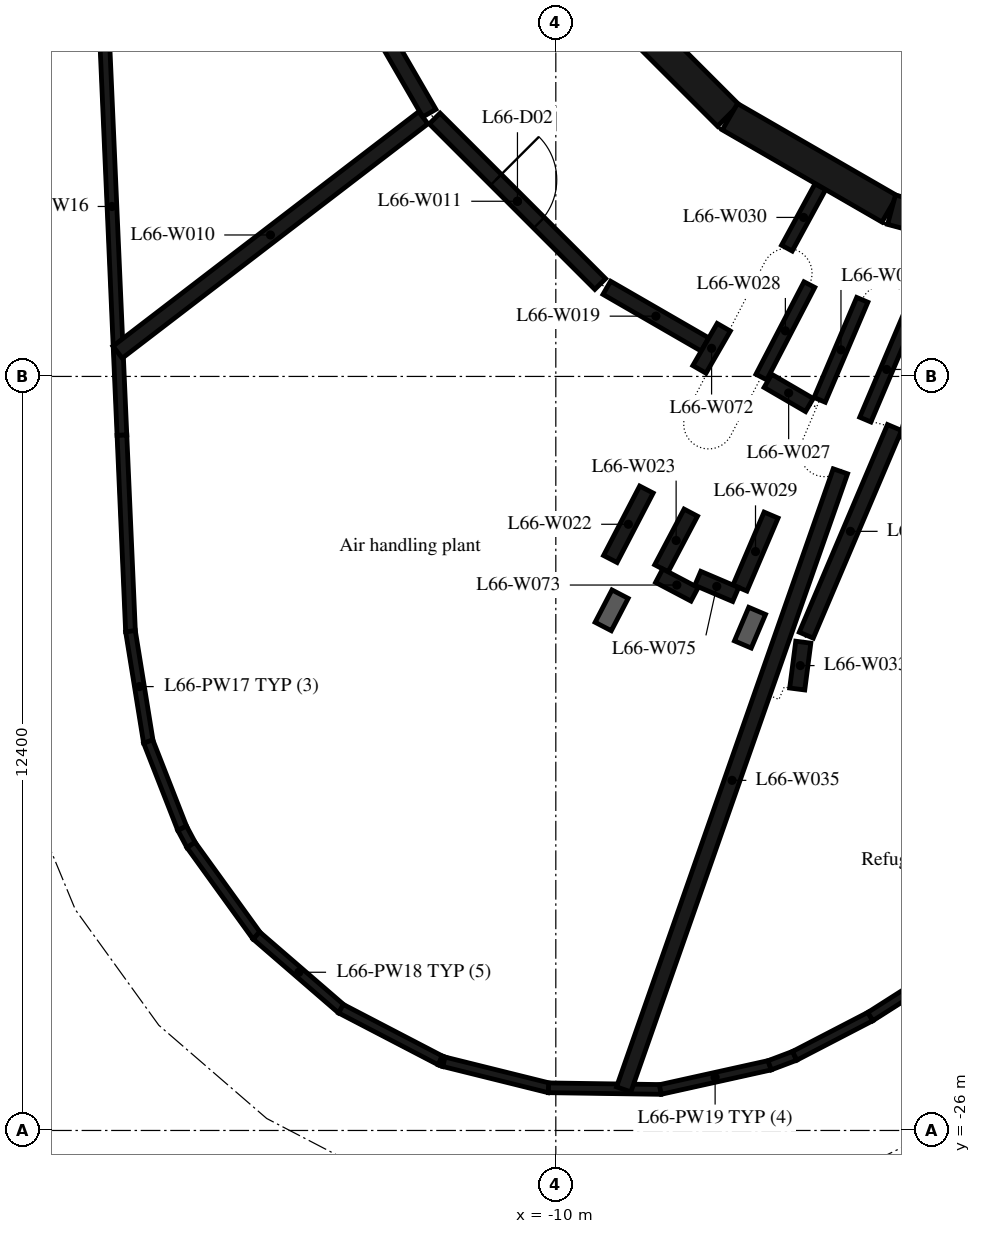
"""IFC4 building model, lengths in metres.
Left out: names, types, materials, properties, quantities, classifications, styles, units other than length and angle.
Written with IfcOpenShell. Run it as: python <this file> out.ifc"""

import sys

from ifc_helpers import new_model, si_unit, direction, frame, frame_2d, origin, place, context, subcontext, project, spatial, rectangle, extrude, element, fill, save


model = new_model("IFC4")
c1 = context("Model", 3, precision=1e-05, world=origin(), true_north=direction((0.0, 1.0)))
c2 = subcontext(c1, "Body", "Model", "MODEL_VIEW")
j1 = project(units=[si_unit("LENGTHUNIT", "METRE"), si_unit("PLANEANGLEUNIT", "RADIAN")], contexts=[c1])
p1 = place(None, origin())
s1 = spatial("IfcSite", under=j1, at=p1, CompositionType="ELEMENT")
p2 = place(p1, origin())
s2 = spatial("IfcBuilding", under=s1, at=p2, CompositionType="ELEMENT")
p3 = place(p2, frame((0.0, 0.0, 258.2)))
s3 = spatial("IfcBuildingStorey", under=s2, at=p3, CompositionType="ELEMENT", Elevation=258.2)
p4 = place(p3, frame((-17.464, -7.043, 0.0), z_axis=(0.0, 0.0, 1.0), x_axis=(0.043607469261, -0.999048741866, 0.0)))
e1 = element("IfcWall", 1, at=p4, inside=s3, PredefinedType="STANDARD", context=c2, shape_type="SweptSolid", body=[
    extrude(rectangle(XDim=7.53, YDim=0.16, at=frame_2d((3.765, 0.0))), origin(), (0.0, 0.0, 1.0), 4.75),
])
p5 = place(p3, frame((-17.135, -14.566, 0.0), z_axis=(0.0, 0.0, 1.0), x_axis=(0.043601186165, -0.999049016097, 0.0)))
e2 = element("IfcWall", 2, at=p5, inside=s3, PredefinedType="STANDARD", context=c2, shape_type="SweptSolid", body=[
    extrude(rectangle(XDim=3.231, YDim=0.16, at=frame_2d((1.615, 0.0))), origin(), (0.0, 0.0, 1.0), 4.75),
])
p6 = place(p3, frame((-16.995, -17.79, 0.0), z_axis=(0.0, 0.0, 1.0), x_axis=(0.159398794206, -0.987214274819, 0.0)))
e3 = element("IfcWall", 3, at=p6, inside=s3, PredefinedType="STANDARD", context=c2, shape_type="SweptSolid", body=[
    extrude(rectangle(XDim=1.846, YDim=0.16, at=frame_2d((0.923, 0.0))), origin(), (0.0, 0.0, 1.0), 4.75),
])
p7 = place(p3, frame((-16.703, -19.603, 0.0), z_axis=(0.0, 0.0, 1.0), x_axis=(0.364345262894, -0.931263941859, 0.0)))
e4 = element("IfcWall", 4, at=p7, inside=s3, PredefinedType="STANDARD", context=c2, shape_type="SweptSolid", body=[
    extrude(rectangle(XDim=1.532, YDim=0.16, at=frame_2d((0.766, 0.0))), origin(), (0.0, 0.0, 1.0), 4.75),
])
p8 = place(p3, frame((-16.145, -21.03, 0.0), z_axis=(0.0, 0.0, 1.0), x_axis=(0.469946224653, -0.882695046964, 0.0)))
e5 = element("IfcWall", 5, at=p8, inside=s3, PredefinedType="STANDARD", context=c2, shape_type="SweptSolid", body=[
    extrude(rectangle(XDim=0.316, YDim=0.16, at=frame_2d((0.158, 0.0))), origin(), (0.0, 0.0, 1.0), 4.75),
])
p9 = place(p3, frame((-16.0, -21.304, 0.0), z_axis=(0.0, 0.0, 1.0), x_axis=(0.585495381547, -0.810675741704, 0.0)))
e6 = element("IfcWall", 6, at=p9, inside=s3, PredefinedType="STANDARD", context=c2, shape_type="SweptSolid", body=[
    extrude(rectangle(XDim=1.846, YDim=0.16, at=frame_2d((0.923, 0.0))), origin(), (0.0, 0.0, 1.0), 4.75),
])
p10 = place(p3, frame((-14.925, -22.794, 0.0), z_axis=(0.0, 0.0, 1.0), x_axis=(0.756621004278, -0.653853696086, 0.0)))
e7 = element("IfcWall", 7, at=p10, inside=s3, PredefinedType="STANDARD", context=c2, shape_type="SweptSolid", body=[
    extrude(rectangle(XDim=1.848, YDim=0.16, at=frame_2d((0.924, 0.0))), origin(), (0.0, 0.0, 1.0), 4.75),
])
p11 = place(p3, frame((-13.534, -23.997, 0.0), z_axis=(0.0, 0.0, 1.0), x_axis=(0.887034839899, -0.461702493826, 0.0)))
e8 = element("IfcWall", 8, at=p11, inside=s3, PredefinedType="STANDARD", context=c2, shape_type="SweptSolid", body=[
    extrude(rectangle(XDim=1.846, YDim=0.16, at=frame_2d((0.923, 0.0))), origin(), (0.0, 0.0, 1.0), 4.75),
])
p12 = place(p3, frame((-11.901, -24.848, 0.0), z_axis=(0.0, 0.0, 1.0), x_axis=(0.935554876833, -0.353181359126, 0.0)))
e9 = element("IfcWall", 9, at=p12, inside=s3, PredefinedType="STANDARD", context=c2, shape_type="SweptSolid", body=[
    extrude(rectangle(XDim=0.065, YDim=0.16, at=frame_2d((0.032, 0.0))), origin(), (0.0, 0.0, 1.0), 4.75),
])
p13 = place(p3, frame((-11.84, -24.871, 0.0), z_axis=(0.0, 0.0, 1.0), x_axis=(0.970536274292, -0.240955058637, 0.0)))
e10 = element("IfcWall", 10, at=p13, inside=s3, PredefinedType="STANDARD", context=c2, shape_type="SweptSolid", body=[
    extrude(rectangle(XDim=1.781, YDim=0.16, at=frame_2d((0.891, 0.0))), origin(), (0.0, 0.0, 1.0), 4.75),
])
p14 = place(p3, frame((-10.12, -25.299, 0.0), z_axis=(0.0, 0.0, 1.0), x_axis=(0.999894413213, -0.014531428914, 0.0)))
e11 = element("IfcWall", 11, at=p14, inside=s3, PredefinedType="STANDARD", context=c2, shape_type="SweptSolid", body=[
    extrude(rectangle(XDim=1.848, YDim=0.16, at=frame_2d((0.924, 0.0))), origin(), (0.0, 0.0, 1.0), 4.75),
])
p15 = place(p3, frame((-8.281, -25.326, 0.0), z_axis=(0.0, 0.0, 1.0), x_axis=(0.976289627281, 0.216468389524, 0.0)))
e12 = element("IfcWall", 12, at=p15, inside=s3, PredefinedType="STANDARD", context=c2, shape_type="SweptSolid", body=[
    extrude(rectangle(XDim=1.846, YDim=0.16, at=frame_2d((0.923, 0.0))), origin(), (0.0, 0.0, 1.0), 4.75),
])
p16 = place(p3, frame((-6.484, -24.928, 0.0), z_axis=(0.0, 0.0, 1.0), x_axis=(0.93530111793, 0.353852820815, 0.0)))
e13 = element("IfcWall", 13, at=p16, inside=s3, PredefinedType="STANDARD", context=c2, shape_type="SweptSolid", body=[
    extrude(rectangle(XDim=0.441, YDim=0.16, at=frame_2d((0.22, 0.0))), origin(), (0.0, 0.0, 1.0), 4.75),
])
p17 = place(p3, frame((-6.072, -24.772, 0.0), z_axis=(0.0, 0.0, 1.0), x_axis=(0.887654565079, 0.460509905533, 0.0)))
e14 = element("IfcWall", 14, at=p17, inside=s3, PredefinedType="STANDARD", context=c2, shape_type="SweptSolid", body=[
    extrude(rectangle(XDim=1.405, YDim=0.16, at=frame_2d((0.702, 0.0))), origin(), (0.0, 0.0, 1.0), 4.75),
])
p18 = place(p3, frame((-4.828, -24.127, 0.0), z_axis=(0.0, 0.0, 1.0), x_axis=(0.843393436183, 0.537296484079, 0.0)))
e15 = element("IfcWall", 15, at=p18, inside=s3, PredefinedType="STANDARD", context=c2, shape_type="SweptSolid", body=[
    extrude(rectangle(XDim=5.74, YDim=0.16, at=frame_2d((2.87, 0.0))), origin(), (0.0, 0.0, 1.0), 4.75),
])
p19 = place(p3, frame((-9.308, -7.164, 0.0), z_axis=(0.0, 0.0, 1.0), x_axis=(0.707106781187, -0.707106781187, 0.0)))
e16 = element("IfcWall", 16, at=p19, inside=s3, PredefinedType="SHEAR", context=c2, shape_type="SweptSolid", body=[
    extrude(rectangle(XDim=3.032, YDim=0.5, at=frame_2d((1.516, 0.0))), origin(), (0.0, 0.0, 1.0), 4.75),
])
for number, where, z_axis, x_axis in (
    (17, (-7.137, -9.329, 0.0), (0.0, 0.0, 1.0), (0.866, -0.5, 0.0)),
    (18, (-4.479, -10.858, 0.0), (0.0, 0.0, 1.0), (0.966, -0.259, 0.0)),
):
    element("IfcWall", number, at=place(p3, frame(where, z_axis=z_axis, x_axis=x_axis)), inside=s3, PredefinedType="SHEAR", context=c2, shape_type="SweptSolid", body=[
        extrude(rectangle(XDim=3.033, YDim=0.5, at=frame_2d((1.516, 0.0))), origin(), (0.0, 0.0, 1.0), 4.75),
    ])
p20 = place(p3, frame((-14.007, -5.938, 0.0), z_axis=(0.0, 0.0, 1.0), x_axis=(0.500708693508, -0.865615852585, 0.0)))
e19 = element("IfcWall", 19, at=p20, inside=s3, PredefinedType="PARTITIONING", context=c2, shape_type="SweptSolid", body=[
    extrude(rectangle(XDim=3.849, YDim=0.25, at=frame_2d((1.925, 0.0))), origin(), (0.0, 0.0, 1.0), 4.75),
])
p21 = place(p3, frame((-12.179, -9.346, 0.0), z_axis=(0.0, 0.0, 1.0), x_axis=(-0.793517039505, -0.608548032628, 0.0)))
e20 = element("IfcWall", 20, at=p21, inside=s3, PredefinedType="PARTITIONING", context=c2, shape_type="SweptSolid", body=[
    extrude(rectangle(XDim=6.335, YDim=0.25, at=frame_2d((3.168, 0.0))), origin(), (0.0, 0.0, 1.0), 4.75),
])
p22 = place(p3, frame((-11.992, -9.358, 0.0), z_axis=(0.0, 0.0, 1.0), x_axis=(0.707106781187, -0.707106781187, 0.0)))
e21 = element("IfcWall", 21, at=p22, inside=s3, PredefinedType="PARTITIONING", context=c2, shape_type="SweptSolid", body=[
    extrude(rectangle(XDim=3.849, YDim=0.25, at=frame_2d((1.925, 0.0))), origin(), (0.0, 0.0, 1.0), 4.75),
])
p23 = place(p22, frame((1.425, 0.0, 0.0)))
e22 = element("IfcOpeningElement", 22, at=p23, cuts=e21, PredefinedType="OPENING", context=c2, shape_type="SweptSolid", body=[
    extrude(rectangle(XDim=1.0, YDim=2.1, at=frame_2d((0.5, 1.05))), frame((0.0, 0.135, 0.0), z_axis=(0.0, -1.0, 0.0), x_axis=(1.0, 0.0, 0.0)), (0.0, 0.0, 1.0), 0.27),
])
p24 = place(p3, frame((-9.162, -12.143, 0.0), z_axis=(0.0, 0.0, 1.0), x_axis=(0.866067878235, -0.499926424876, 0.0)))
e23 = element("IfcWall", 23, at=p24, inside=s3, PredefinedType="PARTITIONING", context=c2, shape_type="SweptSolid", body=[
    extrude(rectangle(XDim=1.865, YDim=0.25, at=frame_2d((0.933, 0.0))), origin(), (0.0, 0.0, 1.0), 4.75),
])
p25 = place(p3, frame((-8.51, -15.46, 0.0), z_axis=(0.0, 0.0, 1.0), x_axis=(-0.461191515673, -0.887300617531, 0.0)))
e24 = element("IfcWall", 24, at=p25, inside=s3, PredefinedType="PARTITIONING", context=c2, shape_type="SweptSolid", body=[
    extrude(rectangle(XDim=1.287, YDim=0.25, at=frame_2d((0.644, 0.0))), origin(), (0.0, 0.0, 1.0), 4.75),
])
p26 = place(p3, frame((-8.263, -16.755, 0.0), z_axis=(0.0, 0.0, 1.0), x_axis=(0.466640728882, 0.884446962881, 0.0)))
e25 = element("IfcWall", 25, at=p26, inside=s3, PredefinedType="PARTITIONING", context=c2, shape_type="SweptSolid", body=[
    extrude(rectangle(XDim=1.035, YDim=0.25, at=frame_2d((0.518, 0.0))), origin(), (0.0, 0.0, 1.0), 4.75),
])
p27 = place(p3, frame((-6.512, -13.673, 0.0), z_axis=(0.0, 0.0, 1.0), x_axis=(0.864081706907, -0.503351570762, 0.0)))
e26 = element("IfcWall", 26, at=p27, inside=s3, PredefinedType="PARTITIONING", context=c2, shape_type="SweptSolid", body=[
    extrude(rectangle(XDim=0.789, YDim=0.25, at=frame_2d((0.395, 0.0))), origin(), (0.0, 0.0, 1.0), 4.75),
])
p28 = place(p3, frame((-6.62, -13.61, 0.0), z_axis=(0.0, 0.0, 1.0), x_axis=(0.461182211336, 0.887305453577, 0.0)))
e27 = element("IfcWall", 27, at=p28, inside=s3, PredefinedType="PARTITIONING", context=c2, shape_type="SweptSolid", body=[
    extrude(rectangle(XDim=1.713, YDim=0.2, at=frame_2d((0.856, 0.0))), origin(), (0.0, 0.0, 1.0), 4.75),
])
p29 = place(p3, frame((-6.46, -15.88, 0.0), z_axis=(0.0, 0.0, 1.0), x_axis=(-0.39236059396, -0.919811483027, 0.0)))
e28 = element("IfcWall", 28, at=p29, inside=s3, PredefinedType="PARTITIONING", context=c2, shape_type="SweptSolid", body=[
    extrude(rectangle(XDim=1.305, YDim=0.25, at=frame_2d((0.652, 0.0))), origin(), (0.0, 0.0, 1.0), 4.75),
])
p30 = place(p3, frame((-6.2, -11.49, 0.0), z_axis=(0.0, 0.0, 1.0), x_axis=(0.478271968214, 0.878211776521, 0.0)))
e29 = element("IfcWall", 29, at=p30, inside=s3, PredefinedType="PARTITIONING", context=c2, shape_type="SweptSolid", body=[
    extrude(rectangle(XDim=1.15, YDim=0.2, at=frame_2d((0.575, 0.0))), origin(), (0.0, 0.0, 1.0), 4.75),
])
p31 = place(p3, frame((-6.03, -18.74, 0.0), z_axis=(0.0, 0.0, 1.0), x_axis=(0.128909046511, 0.99165642121, 0.0)))
e30 = element("IfcWall", 30, at=p31, inside=s3, PredefinedType="PARTITIONING", context=c2, shape_type="SweptSolid", body=[
    extrude(rectangle(XDim=0.777, YDim=0.25, at=frame_2d((0.388, 0.0))), origin(), (0.0, 0.0, 1.0), 4.75),
])
p32 = place(p3, frame((-5.881, -17.855, 0.0), z_axis=(0.0, 0.0, 1.0), x_axis=(0.391090483061, 0.920352233691, 0.0)))
e31 = element("IfcWall", 31, at=p32, inside=s3, PredefinedType="PARTITIONING", context=c2, shape_type="SweptSolid", body=[
    extrude(rectangle(XDim=3.711, YDim=0.25, at=frame_2d((1.855, 0.0))), origin(), (0.0, 0.0, 1.0), 4.75),
])
p33 = place(p3, frame((-5.32, -15.16, 0.0), z_axis=(0.0, 0.0, 1.0), x_axis=(-0.330837024338, -0.94368790568, 0.0)))
e32 = element("IfcWall", 32, at=p33, inside=s3, PredefinedType="PARTITIONING", context=c2, shape_type="SweptSolid", body=[
    extrude(rectangle(XDim=10.771, YDim=0.25, at=frame_2d((5.385, 0.0))), origin(), (0.0, 0.0, 1.0), 4.75),
])
p34 = place(p3, frame((-4.96, -12.34, 0.0), z_axis=(0.0, 0.0, 1.0), x_axis=(-0.391990471088, -0.919969276974, 0.0)))
e33 = element("IfcWall", 33, at=p34, inside=s3, PredefinedType="PARTITIONING", context=c2, shape_type="SweptSolid", body=[
    extrude(rectangle(XDim=1.788, YDim=0.2, at=frame_2d((0.894, 0.0))), origin(), (0.0, 0.0, 1.0), 4.75),
])
p35 = place(p3, frame((-4.91, -14.31, 0.0), z_axis=(0.0, 0.0, 1.0), x_axis=(0.390497378465, 0.920604039429, 0.0)))
e34 = element("IfcWall", 34, at=p35, inside=s3, PredefinedType="PARTITIONING", context=c2, shape_type="SweptSolid", body=[
    extrude(rectangle(XDim=1.792, YDim=0.2, at=frame_2d((0.896, 0.0))), origin(), (0.0, 0.0, 1.0), 4.75),
])
p36 = place(p3, frame((-4.309, -14.473, 0.0), z_axis=(0.0, 0.0, 1.0), x_axis=(0.965301112602, -0.26113935362, 0.0)))
e35 = element("IfcWall", 35, at=p36, inside=s3, PredefinedType="PARTITIONING", context=c2, shape_type="SweptSolid", body=[
    extrude(rectangle(XDim=2.403, YDim=0.25, at=frame_2d((1.201, 0.0))), origin(), (0.0, 0.0, 1.0), 4.75),
])
p37 = place(p3, frame((-7.638, -13.484, 0.0), z_axis=(0.0, 0.0, 1.0), x_axis=(0.499880961361, 0.866094119867, 0.0)))
e36 = element("IfcWall", 36, at=p37, inside=s3, PredefinedType="PARTITIONING", context=c2, shape_type="SweptSolid", body=[
    extrude(rectangle(XDim=0.8, YDim=0.25, at=frame_2d((0.4, 0.0))), origin(), (0.0, 0.0, 1.0), 4.75),
])
p38 = place(p3, frame((-8.301, -16.877, 0.0), z_axis=(0.0, 0.0, 1.0), x_axis=(0.884571883789, -0.466403883357, 0.0)))
e37 = element("IfcWall", 37, at=p38, inside=s3, PredefinedType="PARTITIONING", context=c2, shape_type="SweptSolid", body=[
    extrude(rectangle(XDim=0.658, YDim=0.25, at=frame_2d((0.329, 0.0))), origin(), (0.0, 0.0, 1.0), 4.75),
])
p39 = place(p3, frame((-7.665, -16.92, 0.0), z_axis=(0.0, 0.0, 1.0), x_axis=(0.919833690765, -0.392308528245, 0.0)))
e38 = element("IfcWall", 38, at=p39, inside=s3, PredefinedType="PARTITIONING", context=c2, shape_type="SweptSolid", body=[
    extrude(rectangle(XDim=0.677, YDim=0.25, at=frame_2d((0.338, 0.0))), origin(), (0.0, 0.0, 1.0), 4.75),
])
p40 = place(p23, origin())
e39 = element("IfcDoor", 39, at=p40, inside=s3, OperationType="SINGLE_SWING_LEFT", PredefinedType="DOOR", context=c2, shape_type="SweptSolid", body=[
    extrude(rectangle(XDim=1.0, YDim=2.1, at=frame_2d((0.5, 1.05))), frame((0.0, 0.025, 0.0), z_axis=(0.0, -1.0, 0.0), x_axis=(1.0, 0.0, 0.0)), (0.0, 0.0, 1.0), 0.05),
])
fill(e22, e39)
save(model, sys.argv[1])
